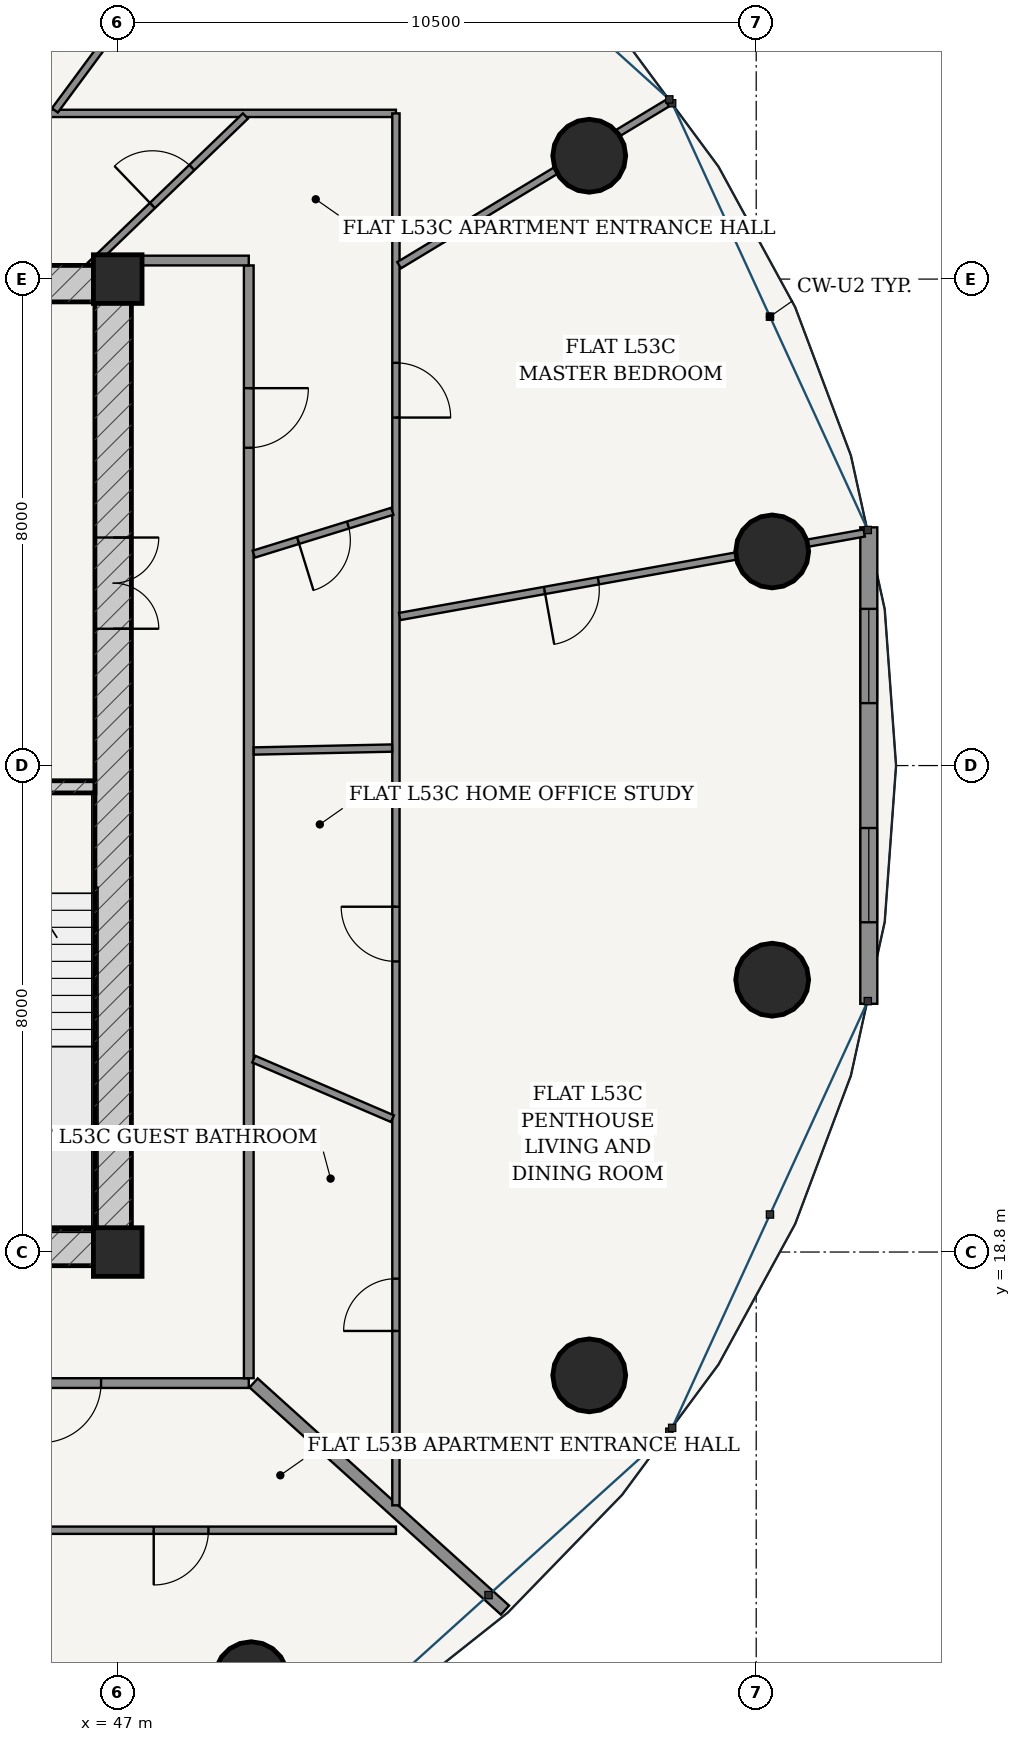
"""IFC4 building model, lengths in metres.
Left out: names, types, materials, properties, quantities, classifications, styles, units other than length and angle.
Written with IfcOpenShell. Run it as: python <this file> out.ifc"""

import sys

from ifc_helpers import new_model, si_unit, direction, frame, frame_2d, origin, origin_2d, place, context, subcontext, project, spatial, rectangle, hollow_circle, extrude, source, transform, mapped, element, fill, save


model = new_model("IFC4")
c1 = context("Model", 3, precision=1e-05, world=origin(), true_north=direction((-0.2419218956, 0.970295726276)))
c2 = subcontext(c1, "Body", "Model", "MODEL_VIEW")
j1 = project(units=[si_unit("LENGTHUNIT", "METRE"), si_unit("PLANEANGLEUNIT", "RADIAN")], contexts=[c1])
p1 = place(None, origin())
s1 = spatial("IfcSite", under=j1, at=p1, CompositionType="ELEMENT")
p2 = place(p1, origin())
s2 = spatial("IfcBuilding", under=s1, at=p2, CompositionType="ELEMENT")
p3 = place(p2, frame((0.0, 0.0, 202.3)))
s3 = spatial("IfcBuildingStorey", under=s2, at=p3, CompositionType="ELEMENT", Elevation=202.3)
for number, where, z_axis, x_axis in (
    (1, (47.0, 18.8, 0.0), (0.0, 0.0, 1.0), (1.0, 0.0, 0.0)),
    (2, (47.0, 34.8, 0.0), (0.0, 0.0, 1.0), (1.0, 0.0, 0.0)),
):
    element("IfcColumn", number, at=place(p3, frame(where, z_axis=z_axis, x_axis=x_axis)), inside=s3, PredefinedType="COLUMN", context=c2, shape_type="SweptSolid", body=[
        extrude(rectangle(XDim=0.8, YDim=0.8, at=origin_2d()), origin(), (0.0, 0.0, 1.0), 3.7),
    ])
p4 = place(p3, frame((28.775, 18.875, 0.0), z_axis=(0.0, 0.0, 1.0), x_axis=(1.0, 0.0, 0.0)))
e3 = element("IfcWall", 3, at=p4, inside=s3, PredefinedType="SHEAR", context=c2, shape_type="SweptSolid", body=[
    extrude(rectangle(XDim=18.45, YDim=0.6, at=frame_2d((9.225, 0.0))), origin(), (0.0, 0.0, 1.0), 3.435),
])
p5 = place(p4, frame((6.76, 0.0, 0.0)))
e4 = element("IfcOpeningElement", 4, at=p5, cuts=e3, PredefinedType="OPENING", context=c2, shape_type="SweptSolid", body=[
    extrude(rectangle(XDim=0.85, YDim=2.1, at=frame_2d((0.425, 1.05))), frame((0.0, 0.31, 0.0), z_axis=(0.0, -1.0, 0.0), x_axis=(1.0, 0.0, 0.0)), (0.0, 0.0, 1.0), 0.62),
])
p6 = place(p4, frame((8.8, 0.0, 0.0)))
e5 = element("IfcOpeningElement", 5, at=p6, cuts=e3, PredefinedType="OPENING", context=c2, shape_type="SweptSolid", body=[
    extrude(rectangle(XDim=0.85, YDim=2.1, at=frame_2d((0.425, 1.05))), frame((0.0, 0.31, 0.0), z_axis=(0.0, -1.0, 0.0), x_axis=(1.0, 0.0, 0.0)), (0.0, 0.0, 1.0), 0.62),
])
p7 = place(p4, frame((10.84, 0.0, 0.0)))
e6 = element("IfcOpeningElement", 6, at=p7, cuts=e3, PredefinedType="OPENING", context=c2, shape_type="SweptSolid", body=[
    extrude(rectangle(XDim=0.85, YDim=2.1, at=frame_2d((0.425, 1.05))), frame((0.0, 0.31, 0.0), z_axis=(0.0, -1.0, 0.0), x_axis=(1.0, 0.0, 0.0)), (0.0, 0.0, 1.0), 0.62),
])
p8 = place(p3, frame((28.775, 34.725, 0.0), z_axis=(0.0, 0.0, 1.0), x_axis=(1.0, 0.0, 0.0)))
e7 = element("IfcWall", 7, at=p8, inside=s3, PredefinedType="SHEAR", context=c2, shape_type="SweptSolid", body=[
    extrude(rectangle(XDim=18.45, YDim=0.6, at=frame_2d((9.225, 0.0))), origin(), (0.0, 0.0, 1.0), 3.435),
])
p9 = place(p3, frame((46.925, 19.175, 0.0), z_axis=(0.0, 0.0, 1.0), x_axis=(0.0, 1.0, 0.0)))
e8 = element("IfcWall", 8, at=p9, inside=s3, PredefinedType="SHEAR", context=c2, shape_type="SweptSolid", body=[
    extrude(rectangle(XDim=15.25, YDim=0.6, at=frame_2d((7.625, 0.0))), origin(), (0.0, 0.0, 1.0), 3.435),
])
p10 = place(p9, frame((9.875, 0.0, 0.0)))
e9 = element("IfcOpeningElement", 9, at=p10, cuts=e8, PredefinedType="OPENING", context=c2, shape_type="SweptSolid", body=[
    extrude(rectangle(XDim=1.5, YDim=2.2, at=frame_2d((0.75, 1.1))), frame((0.0, 0.31, 0.0), z_axis=(0.0, -1.0, 0.0), x_axis=(1.0, 0.0, 0.0)), (0.0, 0.0, 1.0), 0.62),
])
p11 = place(p3, frame((43.305, 26.45, 0.0), z_axis=(0.0, 0.0, 1.0), x_axis=(1.0, 0.0, 0.0)))
e10 = element("IfcWall", 10, at=p11, inside=s3, PredefinedType="SOLIDWALL", context=c2, shape_type="SweptSolid", body=[
    extrude(rectangle(XDim=3.32, YDim=0.2, at=frame_2d((1.66, 0.0))), origin(), (0.0, 0.0, 1.0), 3.435),
])
p12 = place(p11, frame((1.185, 0.0, 0.0)))
e11 = element("IfcOpeningElement", 11, at=p12, cuts=e10, PredefinedType="OPENING", context=c2, shape_type="SweptSolid", body=[
    extrude(rectangle(XDim=0.95, YDim=2.15, at=frame_2d((0.475, 1.075))), frame((0.0, 0.11, 0.0), z_axis=(0.0, -1.0, 0.0), x_axis=(1.0, 0.0, 0.0)), (0.0, 0.0, 1.0), 0.22),
])
for number, where, z_axis, x_axis in (
    (12, (57.763, 30.321, 0.0), (0.0, 0.0, 1.0), (1.0, 0.0, 0.0)),
    (13, (54.754, 36.828, 0.0), (0.0, 0.0, 1.0), (1.0, 0.0, 0.0)),
    (14, (49.195, 11.792, 0.0), (0.0, 0.0, 1.0), (1.0, 0.0, 0.0)),
    (15, (54.754, 16.772, 0.0), (0.0, 0.0, 1.0), (1.0, 0.0, 0.0)),
    (16, (57.763, 23.279, 0.0), (0.0, 0.0, 1.0), (1.0, 0.0, 0.0)),
):
    element("IfcColumn", number, at=place(p3, frame(where, z_axis=z_axis, x_axis=x_axis)), inside=s3, PredefinedType="COLUMN", context=c2, shape_type="SweptSolid", body=[
        extrude(hollow_circle(Radius=0.6, WallThickness=0.038, at=origin_2d()), origin(), (0.0, 0.0, 1.0), 3.7),
    ])
p13 = place(p3, frame((59.352, 22.883, 0.0), z_axis=(0.0, 0.0, 1.0), x_axis=(0.0, 1.0, 0.0)))
e17 = element("IfcWall", 17, at=p13, inside=s3, PredefinedType="SOLIDWALL", context=c2, shape_type="SweptSolid", body=[
    extrude(rectangle(XDim=7.835, YDim=0.28, at=frame_2d((3.917, 0.0))), origin(), (0.0, 0.0, 1.0), 3.435),
])
p14 = place(p13, frame((1.34, 0.0, 0.85)))
e18 = element("IfcOpeningElement", 18, at=p14, cuts=e17, PredefinedType="OPENING", context=c2, shape_type="SweptSolid", body=[
    extrude(rectangle(XDim=1.55, YDim=1.95, at=frame_2d((0.775, 0.975))), frame((0.0, 0.15, 0.0), z_axis=(0.0, -1.0, 0.0), x_axis=(1.0, 0.0, 0.0)), (0.0, 0.0, 1.0), 0.3),
])
p15 = place(p13, frame((4.944, 0.0, 0.85)))
e19 = element("IfcOpeningElement", 19, at=p15, cuts=e17, PredefinedType="OPENING", context=c2, shape_type="SweptSolid", body=[
    extrude(rectangle(XDim=1.55, YDim=1.95, at=frame_2d((0.775, 0.975))), frame((0.0, 0.15, 0.0), z_axis=(0.0, -1.0, 0.0), x_axis=(1.0, 0.0, 0.0)), (0.0, 0.0, 1.0), 0.3),
])
p16 = place(p3, frame((34.32, 16.645, 0.0), z_axis=(0.0, 0.0, 1.0), x_axis=(1.0, 0.0, 0.0)))
e20 = element("IfcWall", 20, at=p16, inside=s3, PredefinedType="PARTITIONING", context=c2, shape_type="SweptSolid", body=[
    extrude(rectangle(XDim=14.835, YDim=0.16, at=frame_2d((7.417, 0.0))), origin(), (0.0, 0.0, 1.0), 2.951),
])
p17 = place(p16, frame((11.426, 0.0, 0.0)))
e21 = element("IfcOpeningElement", 21, at=p17, cuts=e20, PredefinedType="OPENING", context=c2, shape_type="SweptSolid", body=[
    extrude(rectangle(XDim=0.98, YDim=2.2, at=frame_2d((0.49, 1.1))), frame((0.0, 0.09, 0.0), z_axis=(0.0, -1.0, 0.0), x_axis=(1.0, 0.0, 0.0)), (0.0, 0.0, 1.0), 0.18),
])
p18 = place(p3, frame((49.155, 16.725, 0.0), z_axis=(0.0, 0.0, 1.0), x_axis=(0.0, 1.0, 0.0)))
e22 = element("IfcWall", 22, at=p18, inside=s3, PredefinedType="PARTITIONING", context=c2, shape_type="SweptSolid", body=[
    extrude(rectangle(XDim=18.3, YDim=0.16, at=frame_2d((9.15, 0.0))), origin(), (0.0, 0.0, 1.0), 2.951),
])
p19 = place(p18, frame((15.302, 0.0, 0.0)))
e23 = element("IfcOpeningElement", 23, at=p19, cuts=e22, PredefinedType="OPENING", context=c2, shape_type="SweptSolid", body=[
    extrude(rectangle(XDim=0.98, YDim=2.2, at=frame_2d((0.49, 1.1))), frame((0.0, 0.09, 0.0), z_axis=(0.0, -1.0, 0.0), x_axis=(1.0, 0.0, 0.0)), (0.0, 0.0, 1.0), 0.18),
])
p20 = place(p3, frame((47.225, 35.105, 0.0), z_axis=(0.0, 0.0, 1.0), x_axis=(1.0, 0.0, 0.0)))
e24 = element("IfcWall", 24, at=p20, inside=s3, PredefinedType="PARTITIONING", context=c2, shape_type="SweptSolid", body=[
    extrude(rectangle(XDim=1.93, YDim=0.16, at=frame_2d((0.965, 0.0))), origin(), (0.0, 0.0, 1.0), 3.435),
])
p21 = place(p3, frame((51.575, 14.225, 0.0), z_axis=(0.0, 0.0, 1.0), x_axis=(-1.0, 0.0, 0.0)))
e25 = element("IfcWall", 25, at=p21, inside=s3, PredefinedType="PARTITIONING", context=c2, shape_type="SweptSolid", body=[
    extrude(rectangle(XDim=19.675, YDim=0.12, at=frame_2d((9.837, 0.0))), origin(), (0.0, 0.0, 1.0), 2.951),
])
p22 = place(p21, frame((3.083, 0.0, 0.0)))
e26 = element("IfcOpeningElement", 26, at=p22, cuts=e25, PredefinedType="OPENING", context=c2, shape_type="SweptSolid", body=[
    extrude(rectangle(XDim=0.9, YDim=2.15, at=frame_2d((0.45, 1.075))), frame((0.0, 0.07, 0.0), z_axis=(0.0, -1.0, 0.0), x_axis=(1.0, 0.0, 0.0)), (0.0, 0.0, 1.0), 0.14),
])
p23 = place(p21, frame((12.063, 0.0, 0.0)))
e27 = element("IfcOpeningElement", 27, at=p23, cuts=e25, PredefinedType="OPENING", context=c2, shape_type="SweptSolid", body=[
    extrude(rectangle(XDim=0.9, YDim=2.15, at=frame_2d((0.45, 1.075))), frame((0.0, 0.07, 0.0), z_axis=(0.0, -1.0, 0.0), x_axis=(1.0, 0.0, 0.0)), (0.0, 0.0, 1.0), 0.14),
])
p24 = place(p21, frame((17.777, 0.0, 0.0)))
e28 = element("IfcOpeningElement", 28, at=p24, cuts=e25, PredefinedType="OPENING", context=c2, shape_type="SweptSolid", body=[
    extrude(rectangle(XDim=0.9, YDim=2.15, at=frame_2d((0.45, 1.075))), frame((0.0, 0.07, 0.0), z_axis=(0.0, -1.0, 0.0), x_axis=(1.0, 0.0, 0.0)), (0.0, 0.0, 1.0), 0.14),
])
p25 = place(p3, frame((43.79, 14.169, 0.0), z_axis=(0.0, 0.0, 1.0), x_axis=(0.416687974363, -0.909049576218, 0.0)))
e29 = element("IfcWall", 29, at=p25, inside=s3, PredefinedType="PARTITIONING", context=c2, shape_type="SweptSolid", body=[
    extrude(rectangle(XDim=6.065, YDim=0.12, at=frame_2d((3.033, 0.0))), origin(), (0.0, 0.0, 1.0), 2.951),
])
p26 = place(p25, frame((2.583, 0.0, 0.0)))
e30 = element("IfcOpeningElement", 30, at=p26, cuts=e29, PredefinedType="OPENING", context=c2, shape_type="SweptSolid", body=[
    extrude(rectangle(XDim=0.9, YDim=2.15, at=frame_2d((0.45, 1.075))), frame((0.0, 0.07, 0.0), z_axis=(0.0, -1.0, 0.0), x_axis=(1.0, 0.0, 0.0)), (0.0, 0.0, 1.0), 0.14),
])
p27 = place(p3, frame((49.235, 16.647, 0.0), z_axis=(0.0, 0.0, 1.0), x_axis=(0.741935290449, -0.670471494387, 0.0)))
e31 = element("IfcWall", 31, at=p27, inside=s3, PredefinedType="PARTITIONING", context=c2, shape_type="SweptSolid", body=[
    extrude(rectangle(XDim=5.572, YDim=0.2, at=frame_2d((2.786, 0.0))), origin(), (0.0, 0.0, 1.0), 2.951),
])
p28 = place(p3, frame((44.725, 37.525, 0.0), z_axis=(0.0, 0.0, 1.0), x_axis=(1.0, 0.0, 0.0)))
e32 = element("IfcWall", 32, at=p28, inside=s3, PredefinedType="PARTITIONING", context=c2, shape_type="SweptSolid", body=[
    extrude(rectangle(XDim=6.85, YDim=0.12, at=frame_2d((3.425, 0.0))), origin(), (0.0, 0.0, 1.0), 2.951),
])
p29 = place(p3, frame((51.575, 37.525, 0.0), z_axis=(0.0, 0.0, 1.0), x_axis=(0.0, -1.0, 0.0)))
e33 = element("IfcWall", 33, at=p29, inside=s3, PredefinedType="PARTITIONING", context=c2, shape_type="SweptSolid", body=[
    extrude(rectangle(XDim=22.89, YDim=0.12, at=frame_2d((11.445, 0.0))), origin(), (0.0, 0.0, 1.0), 2.951),
])
p30 = place(p29, frame((4.102, 0.0, 0.0)))
e34 = element("IfcOpeningElement", 34, at=p30, cuts=e33, PredefinedType="OPENING", context=c2, shape_type="SweptSolid", body=[
    extrude(rectangle(XDim=0.9, YDim=2.15, at=frame_2d((0.45, 1.075))), frame((0.0, 0.07, 0.0), z_axis=(0.0, -1.0, 0.0), x_axis=(1.0, 0.0, 0.0)), (0.0, 0.0, 1.0), 0.14),
])
p31 = place(p29, frame((19.163, 0.0, 0.0)))
e35 = element("IfcOpeningElement", 35, at=p31, cuts=e33, PredefinedType="OPENING", context=c2, shape_type="SweptSolid", body=[
    extrude(rectangle(XDim=0.86, YDim=2.15, at=frame_2d((0.43, 1.075))), frame((0.0, 0.07, 0.0), z_axis=(0.0, -1.0, 0.0), x_axis=(1.0, 0.0, 0.0)), (0.0, 0.0, 1.0), 0.14),
])
p32 = place(p29, frame((13.046, 0.0, 0.0)))
e36 = element("IfcOpeningElement", 36, at=p32, cuts=e33, PredefinedType="OPENING", context=c2, shape_type="SweptSolid", body=[
    extrude(rectangle(XDim=0.9, YDim=2.15, at=frame_2d((0.45, 1.075))), frame((0.0, 0.07, 0.0), z_axis=(0.0, -1.0, 0.0), x_axis=(1.0, 0.0, 0.0)), (0.0, 0.0, 1.0), 0.14),
])
p33 = place(p3, frame((51.636, 29.251, 0.0), z_axis=(0.0, 0.0, 1.0), x_axis=(0.984223216243, 0.176931231294, 0.0)))
e37 = element("IfcWall", 37, at=p33, inside=s3, PredefinedType="PARTITIONING", context=c2, shape_type="SweptSolid", body=[
    extrude(rectangle(XDim=7.763, YDim=0.12, at=frame_2d((3.882, 0.0))), origin(), (0.0, 0.0, 1.0), 2.951),
])
p34 = place(p33, frame((2.421, 0.0, 0.0)))
e38 = element("IfcOpeningElement", 38, at=p34, cuts=e37, PredefinedType="OPENING", context=c2, shape_type="SweptSolid", body=[
    extrude(rectangle(XDim=0.9, YDim=2.15, at=frame_2d((0.45, 1.075))), frame((0.0, 0.07, 0.0), z_axis=(0.0, -1.0, 0.0), x_axis=(1.0, 0.0, 0.0)), (0.0, 0.0, 1.0), 0.14),
])
p35 = place(p3, frame((51.628, 35.029, 0.0), z_axis=(0.0, 0.0, 1.0), x_axis=(0.856041879651, 0.516906471505, 0.0)))
e39 = element("IfcWall", 39, at=p35, inside=s3, PredefinedType="PARTITIONING", context=c2, shape_type="SweptSolid", body=[
    extrude(rectangle(XDim=5.149, YDim=0.12, at=frame_2d((2.574, 0.0))), origin(), (0.0, 0.0, 1.0), 2.951),
])
p36 = place(p3, frame((45.967, 37.575, 0.0), z_axis=(0.0, 0.0, 1.0), x_axis=(0.59452500855, 0.804077119565, 0.0)))
e40 = element("IfcWall", 40, at=p36, inside=s3, PredefinedType="PARTITIONING", context=c2, shape_type="SweptSolid", body=[
    extrude(rectangle(XDim=6.867, YDim=0.12, at=frame_2d((3.434, 0.0))), origin(), (0.0, 0.0, 1.0), 2.951),
])
p37 = place(p36, frame((1.975, 0.0, 0.0)))
e41 = element("IfcOpeningElement", 41, at=p37, cuts=e40, PredefinedType="OPENING", context=c2, shape_type="SweptSolid", body=[
    extrude(rectangle(XDim=0.9, YDim=2.15, at=frame_2d((0.45, 1.075))), frame((0.0, 0.07, 0.0), z_axis=(0.0, -1.0, 0.0), x_axis=(1.0, 0.0, 0.0)), (0.0, 0.0, 1.0), 0.14),
])
p38 = place(p3, frame((49.237, 21.973, 0.0), z_axis=(0.0, 0.0, 1.0), x_axis=(0.91880901308, -0.394702416364, 0.0)))
e42 = element("IfcWall", 42, at=p38, inside=s3, PredefinedType="PARTITIONING", context=c2, shape_type="SweptSolid", body=[
    extrude(rectangle(XDim=2.483, YDim=0.12, at=frame_2d((1.241, 0.0))), origin(), (0.0, 0.0, 1.0), 3.11),
])
p39 = place(p3, frame((49.237, 27.039, 0.0), z_axis=(0.0, 0.0, 1.0), x_axis=(0.999772223164, 0.021342487922, 0.0)))
e43 = element("IfcWall", 43, at=p39, inside=s3, PredefinedType="PARTITIONING", context=c2, shape_type="SweptSolid", body=[
    extrude(rectangle(XDim=2.276, YDim=0.12, at=frame_2d((1.138, 0.0))), origin(), (0.0, 0.0, 1.0), 3.435),
])
p40 = place(p3, frame((49.237, 30.277, 0.0), z_axis=(0.0, 0.0, 1.0), x_axis=(0.955326488692, 0.295552533406, 0.0)))
e44 = element("IfcWall", 44, at=p40, inside=s3, PredefinedType="PARTITIONING", context=c2, shape_type="SweptSolid", body=[
    extrude(rectangle(XDim=2.386, YDim=0.12, at=frame_2d((1.193, 0.0))), origin(), (0.0, 0.0, 1.0), 3.435),
])
p41 = place(p40, frame((0.763, 0.0, 0.0)))
e45 = element("IfcOpeningElement", 45, at=p41, cuts=e44, PredefinedType="OPENING", context=c2, shape_type="SweptSolid", body=[
    extrude(rectangle(XDim=0.86, YDim=2.15, at=frame_2d((0.43, 1.075))), frame((0.0, 0.07, 0.0), z_axis=(0.0, -1.0, 0.0), x_axis=(1.0, 0.0, 0.0)), (0.0, 0.0, 1.0), 0.14),
])
p42 = place(p3, frame((46.549, 35.026, 0.0), z_axis=(0.0, 0.0, 1.0), x_axis=(0.720557461206, 0.693395230082, 0.0)))
e46 = element("IfcWall", 46, at=p42, inside=s3, PredefinedType="PARTITIONING", context=c2, shape_type="SweptSolid", body=[
    extrude(rectangle(XDim=3.541, YDim=0.12, at=frame_2d((1.771, 0.0))), origin(), (0.0, 0.0, 1.0), 2.951),
])
p43 = place(p42, frame((1.419, 0.0, 0.0)))
e47 = element("IfcOpeningElement", 47, at=p43, cuts=e46, PredefinedType="OPENING", context=c2, shape_type="SweptSolid", body=[
    extrude(rectangle(XDim=0.9, YDim=2.15, at=frame_2d((0.45, 1.075))), frame((0.0, 0.07, 0.0), z_axis=(0.0, -1.0, 0.0), x_axis=(1.0, 0.0, 0.0)), (0.0, 0.0, 1.0), 0.14),
])
m1 = source(origin(), c2, "Body", "SweptSolid", [
    extrude(rectangle(XDim=1.55, YDim=1.95, at=frame_2d((0.775, 0.975))), frame((0.0, 0.03, 0.0), z_axis=(0.0, -1.0, 0.0), x_axis=(1.0, 0.0, 0.0)), (0.0, 0.0, 1.0), 0.06),
])
p44 = place(p14, origin())
e48 = element("IfcWindow", 48, at=p44, inside=s3, PartitioningType="SINGLE_PANEL", PredefinedType="WINDOW", context=c2, shape_type="MappedRepresentation", body=[
    mapped(m1, transform((0.0, 0.0, 0.0), scale=1.0)),
])
fill(e18, e48)
p45 = place(p15, origin())
e49 = element("IfcWindow", 49, at=p45, inside=s3, PartitioningType="SINGLE_PANEL", PredefinedType="WINDOW", context=c2, shape_type="MappedRepresentation", body=[
    mapped(m1, transform((0.0, 0.0, 0.0), scale=1.0)),
])
fill(e19, e49)
m2 = source(origin(), c2, "Body", "SweptSolid", [
    extrude(rectangle(XDim=1.5, YDim=2.2, at=frame_2d((0.75, 1.1))), frame((0.0, 0.025, 0.0), z_axis=(0.0, -1.0, 0.0), x_axis=(1.0, 0.0, 0.0)), (0.0, 0.0, 1.0), 0.05),
])
p46 = place(p10, frame((1.5, 0.0, 0.0), z_axis=(0.0, 0.0, 1.0), x_axis=(-1.0, 0.0, 0.0)))
e50 = element("IfcDoor", 50, at=p46, inside=s3, OperationType="DOUBLE_DOOR_SINGLE_SWING", PredefinedType="DOOR", context=c2, shape_type="MappedRepresentation", body=[
    mapped(m2, transform((0.0, 0.0, 0.0), scale=1.0)),
])
fill(e9, e50)
m3 = source(origin(), c2, "Body", "SweptSolid", [
    extrude(rectangle(XDim=0.98, YDim=2.2, at=frame_2d((0.49, 1.1))), frame((0.0, 0.025, 0.0), z_axis=(0.0, -1.0, 0.0), x_axis=(1.0, 0.0, 0.0)), (0.0, 0.0, 1.0), 0.05),
])
p47 = place(p17, frame((0.98, 0.0, 0.0), z_axis=(0.0, 0.0, 1.0), x_axis=(-1.0, 0.0, 0.0)))
e51 = element("IfcDoor", 51, at=p47, inside=s3, OperationType="SINGLE_SWING_RIGHT", PredefinedType="DOOR", context=c2, shape_type="MappedRepresentation", body=[
    mapped(m3, transform((0.0, 0.0, 0.0), scale=1.0)),
])
fill(e21, e51)
m4 = source(origin(), c2, "Body", "SweptSolid", [
    extrude(rectangle(XDim=0.9, YDim=2.15, at=frame_2d((0.45, 1.075))), frame((0.0, 0.025, 0.0), z_axis=(0.0, -1.0, 0.0), x_axis=(1.0, 0.0, 0.0)), (0.0, 0.0, 1.0), 0.05),
])
p48 = place(p22, origin())
e52 = element("IfcDoor", 52, at=p48, inside=s3, OperationType="SINGLE_SWING_RIGHT", PredefinedType="DOOR", context=c2, shape_type="MappedRepresentation", body=[
    mapped(m4, transform((0.0, 0.0, 0.0), scale=1.0)),
])
fill(e26, e52)
p49 = place(p19, frame((0.98, 0.0, 0.0), z_axis=(0.0, 0.0, 1.0), x_axis=(-1.0, 0.0, 0.0)))
e53 = element("IfcDoor", 53, at=p49, inside=s3, OperationType="SINGLE_SWING_LEFT", PredefinedType="DOOR", context=c2, shape_type="MappedRepresentation", body=[
    mapped(m3, transform((0.0, 0.0, 0.0), scale=1.0)),
])
fill(e23, e53)
m5 = source(origin(), c2, "Body", "SweptSolid", [
    extrude(rectangle(XDim=0.86, YDim=2.15, at=frame_2d((0.43, 1.075))), frame((0.0, 0.025, 0.0), z_axis=(0.0, -1.0, 0.0), x_axis=(1.0, 0.0, 0.0)), (0.0, 0.0, 1.0), 0.05),
])
p50 = place(p41, frame((0.86, 0.0, 0.0), z_axis=(0.0, 0.0, 1.0), x_axis=(-1.0, 0.0, 0.0)))
e54 = element("IfcDoor", 54, at=p50, inside=s3, OperationType="SINGLE_SWING_RIGHT", PredefinedType="DOOR", context=c2, shape_type="MappedRepresentation", body=[
    mapped(m5, transform((0.0, 0.0, 0.0), scale=1.0)),
])
fill(e45, e54)
p51 = place(p43, origin())
e55 = element("IfcDoor", 55, at=p51, inside=s3, OperationType="SINGLE_SWING_LEFT", PredefinedType="DOOR", context=c2, shape_type="MappedRepresentation", body=[
    mapped(m4, transform((0.0, 0.0, 0.0), scale=1.0)),
])
fill(e47, e55)
p52 = place(p30, origin())
e56 = element("IfcDoor", 56, at=p52, inside=s3, OperationType="SINGLE_SWING_RIGHT", PredefinedType="DOOR", context=c2, shape_type="MappedRepresentation", body=[
    mapped(m4, transform((0.0, 0.0, 0.0), scale=1.0)),
])
fill(e34, e56)
p53 = place(p34, frame((0.9, 0.0, 0.0), z_axis=(0.0, 0.0, 1.0), x_axis=(-1.0, 0.0, 0.0)))
e57 = element("IfcDoor", 57, at=p53, inside=s3, OperationType="SINGLE_SWING_RIGHT", PredefinedType="DOOR", context=c2, shape_type="MappedRepresentation", body=[
    mapped(m4, transform((0.0, 0.0, 0.0), scale=1.0)),
])
fill(e38, e57)
p54 = place(p31, frame((0.86, 0.0, 0.0), z_axis=(0.0, 0.0, 1.0), x_axis=(-1.0, 0.0, 0.0)))
e58 = element("IfcDoor", 58, at=p54, inside=s3, OperationType="SINGLE_SWING_LEFT", PredefinedType="DOOR", context=c2, shape_type="MappedRepresentation", body=[
    mapped(m5, transform((0.0, 0.0, 0.0), scale=1.0)),
])
fill(e35, e58)
p55 = place(p32, frame((0.9, 0.0, 0.0), z_axis=(0.0, 0.0, 1.0), x_axis=(-1.0, 0.0, 0.0)))
e59 = element("IfcDoor", 59, at=p55, inside=s3, OperationType="SINGLE_SWING_RIGHT", PredefinedType="DOOR", context=c2, shape_type="MappedRepresentation", body=[
    mapped(m4, transform((0.0, 0.0, 0.0), scale=1.0)),
])
fill(e36, e59)
save(model, sys.argv[1])
